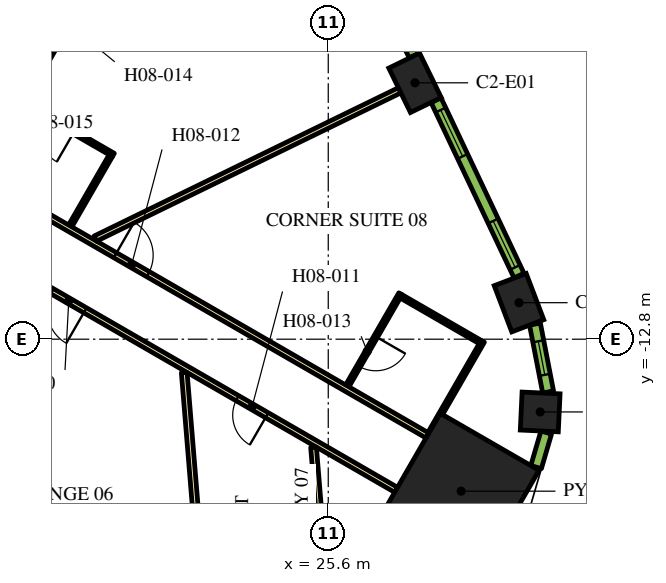
"""IFC4 building model, lengths in metres.
Left out: names, types, materials, properties, quantities, classifications, styles, units other than length and angle.
Written with IfcOpenShell. Run it as: python <this file> out.ifc"""

import sys

from ifc_helpers import new_model, si_unit, direction, frame, frame_2d, origin, origin_2d, place, context, subcontext, project, spatial, rectangle, extrude, element, fill, save


model = new_model("IFC4")
c1 = context("Model", 3, precision=1e-05, world=origin(), true_north=direction((0.0, 1.0)))
c2 = subcontext(c1, "Body", "Model", "MODEL_VIEW")
j1 = project(units=[si_unit("LENGTHUNIT", "METRE"), si_unit("PLANEANGLEUNIT", "RADIAN")], contexts=[c1])
p1 = place(None, origin())
s1 = spatial("IfcSite", under=j1, at=p1, CompositionType="ELEMENT")
p2 = place(p1, origin())
s2 = spatial("IfcBuilding", under=s1, at=p2, CompositionType="ELEMENT")
p3 = place(p2, frame((0.0, 0.0, 107.1)))
s3 = spatial("IfcBuildingStorey", under=s2, at=p3, CompositionType="ELEMENT", Elevation=107.1)
p4 = place(p3, frame((29.097, -16.799, 0.0), z_axis=(0.0, 0.0, 1.0), x_axis=(0.866025403784, -0.5, 0.0)))
e1 = element("IfcColumn", 1, at=p4, inside=s3, PredefinedType="COLUMN", context=c2, shape_type="SweptSolid", body=[
    extrude(rectangle(XDim=3.0, YDim=3.0, at=origin_2d()), origin(), (0.0, 0.0, 1.0), 3.9),
])
p5 = place(p3, frame((31.177, -14.714, 0.0), z_axis=(0.0, 0.0, 1.0), x_axis=(0.046756026083, 0.998906338965, 0.0)))
e2 = element("IfcColumn", 2, at=p5, inside=s3, PredefinedType="COLUMN", context=c2, shape_type="SweptSolid", body=[
    extrude(rectangle(XDim=1.0, YDim=1.0, at=origin_2d()), origin(), (0.0, 0.0, 1.0), 3.9),
])
for number, where, z_axis, x_axis in (
    (3, (30.619, -11.839, 0.0), (0.0, 0.0, 1.0), (-0.355, 0.935, 0.0)),
    (4, (27.883, -6.054, 0.0), (0.0, 0.0, 1.0), (-0.438, 0.899, 0.0)),
):
    element("IfcColumn", number, at=place(p3, frame(where, z_axis=z_axis, x_axis=x_axis)), inside=s3, PredefinedType="COLUMN", context=c2, shape_type="SweptSolid", body=[
        extrude(rectangle(XDim=1.3, YDim=0.9, at=origin_2d()), origin(), (0.0, 0.0, 1.0), 3.9),
    ])
p6 = place(p3, frame((16.412, -8.523, 0.0), z_axis=(0.0, 0.0, 1.0), x_axis=(0.866025629663, -0.499999608766, 0.0)))
e5 = element("IfcWall", 5, at=p6, inside=s3, PredefinedType="PARTITIONING", context=c2, shape_type="SweptSolid", body=[
    extrude(rectangle(XDim=13.624, YDim=0.15, at=frame_2d((6.812, 0.0))), origin(), (0.0, 0.0, 1.0), 2.75),
])
p7 = place(p6, frame((4.134, 0.0, 0.0)))
e6 = element("IfcOpeningElement", 6, at=p7, cuts=e5, PredefinedType="OPENING", context=c2, shape_type="SweptSolid", body=[
    extrude(rectangle(XDim=1.0, YDim=2.1, at=frame_2d((0.5, 1.05))), frame((0.0, 0.085, 0.0), z_axis=(0.0, -1.0, 0.0), x_axis=(1.0, 0.0, 0.0)), (0.0, 0.0, 1.0), 0.17),
])
p8 = place(p3, frame((19.081, -3.9, 0.0), z_axis=(0.0, 0.0, 1.0), x_axis=(-0.499974327079, -0.866040225545, 0.0)))
e7 = element("IfcWall", 7, at=p8, inside=s3, PredefinedType="PARTITIONING", context=c2, shape_type="SweptSolid", body=[
    extrude(rectangle(XDim=5.258, YDim=0.15, at=frame_2d((2.629, 0.0))), origin(), (0.0, 0.0, 1.0), 2.75),
])
p9 = place(p8, frame((0.18, 0.0, 0.0)))
e8 = element("IfcOpeningElement", 8, at=p9, cuts=e7, PredefinedType="OPENING", context=c2, shape_type="SweptSolid", body=[
    extrude(rectangle(XDim=1.0, YDim=2.1, at=frame_2d((0.5, 1.05))), frame((0.0, 0.085, 0.0), z_axis=(0.0, -1.0, 0.0), x_axis=(1.0, 0.0, 0.0)), (0.0, 0.0, 1.0), 0.17),
])
p10 = place(p3, frame((27.386, -16.764, 0.0), z_axis=(0.0, 0.0, 1.0), x_axis=(-0.866022585856, 0.500004880763, 0.0)))
e9 = element("IfcWall", 9, at=p10, inside=s3, PredefinedType="PARTITIONING", context=c2, shape_type="SweptSolid", body=[
    extrude(rectangle(XDim=13.544, YDim=0.15, at=frame_2d((6.772, 0.0))), origin(), (0.0, 0.0, 1.0), 2.75),
])
p11 = place(p10, frame((9.447, 0.0, 0.0)))
e10 = element("IfcOpeningElement", 10, at=p11, cuts=e9, PredefinedType="OPENING", context=c2, shape_type="SweptSolid", body=[
    extrude(rectangle(XDim=1.0, YDim=2.1, at=frame_2d((0.5, 1.05))), frame((0.0, 0.085, 0.0), z_axis=(0.0, -1.0, 0.0), x_axis=(1.0, 0.0, 0.0)), (0.0, 0.0, 1.0), 0.17),
])
p12 = place(p10, frame((3.926, 0.0, 0.0)))
e11 = element("IfcOpeningElement", 11, at=p12, cuts=e9, PredefinedType="OPENING", context=c2, shape_type="SweptSolid", body=[
    extrude(rectangle(XDim=0.9, YDim=2.1, at=frame_2d((0.45, 1.05))), frame((0.0, 0.085, 0.0), z_axis=(0.0, -1.0, 0.0), x_axis=(1.0, 0.0, 0.0)), (0.0, 0.0, 1.0), 0.17),
])
p13 = place(p3, frame((27.478, -6.251, 0.0), z_axis=(0.0, 0.0, 1.0), x_axis=(-0.898940618603, -0.438070501432, 0.0)))
e12 = element("IfcWall", 12, at=p13, inside=s3, PredefinedType="PARTITIONING", context=c2, shape_type="SweptSolid", body=[
    extrude(rectangle(XDim=8.909, YDim=0.15, at=frame_2d((4.455, 0.0))), origin(), (0.0, 0.0, 1.0), 2.75),
])
p14 = place(p3, frame((22.412, -21.016, 0.0), z_axis=(0.0, 0.0, 1.0), x_axis=(-0.081744540534, 0.996653314896, 0.0)))
e13 = element("IfcWall", 13, at=p14, inside=s3, PredefinedType="PARTITIONING", context=c2, shape_type="SweptSolid", body=[
    extrude(rectangle(XDim=7.362, YDim=0.15, at=frame_2d((3.681, 0.0))), origin(), (0.0, 0.0, 1.0), 2.75),
])
p15 = place(p3, frame((25.582, -20.138, 0.0), z_axis=(0.0, 0.0, 1.0), x_axis=(-0.081746132986, 0.996653184283, 0.0)))
e14 = element("IfcWall", 14, at=p15, inside=s3, PredefinedType="PARTITIONING", context=c2, shape_type="SweptSolid", body=[
    extrude(rectangle(XDim=4.51, YDim=0.15, at=frame_2d((2.255, 0.0))), origin(), (0.0, 0.0, 1.0), 2.75),
])
p16 = place(p3, frame((27.5, -11.605, 0.0), z_axis=(0.0, 0.0, 1.0), x_axis=(-0.500049511043, -0.865996816683, 0.0)))
e15 = element("IfcWall", 15, at=p16, inside=s3, PredefinedType="PARTITIONING", context=c2, shape_type="SweptSolid", body=[
    extrude(rectangle(XDim=2.8, YDim=0.1, at=frame_2d((1.4, 0.0))), origin(), (0.0, 0.0, 1.0), 2.75),
])
p17 = place(p16, frame((1.3, 0.0, 0.0)))
e16 = element("IfcOpeningElement", 16, at=p17, cuts=e15, PredefinedType="OPENING", context=c2, shape_type="SweptSolid", body=[
    extrude(rectangle(XDim=0.9, YDim=2.1, at=frame_2d((0.45, 1.05))), frame((0.0, 0.06, 0.0), z_axis=(0.0, -1.0, 0.0), x_axis=(1.0, 0.0, 0.0)), (0.0, 0.0, 1.0), 0.12),
])
p18 = place(p3, frame((27.519, -11.673, 0.0), z_axis=(0.0, 0.0, 1.0), x_axis=(0.866024647952, -0.500001309137, 0.0)))
e17 = element("IfcWall", 17, at=p18, inside=s3, PredefinedType="PARTITIONING", context=c2, shape_type="SweptSolid", body=[
    extrude(rectangle(XDim=2.4, YDim=0.1, at=frame_2d((1.2, 0.0))), origin(), (0.0, 0.0, 1.0), 2.75),
])
p19 = place(p3, frame((28.265, -15.28, 0.0), z_axis=(0.0, 0.0, 1.0), x_axis=(0.500049511043, 0.865996816683, 0.0)))
e18 = element("IfcWall", 18, at=p19, inside=s3, PredefinedType="PARTITIONING", context=c2, shape_type="SweptSolid", body=[
    extrude(rectangle(XDim=2.8, YDim=0.1, at=frame_2d((1.4, 0.0))), origin(), (0.0, 0.0, 1.0), 2.75),
])
p20 = place(p3, frame((19.946, -7.953, 0.0), z_axis=(0.0, 0.0, 1.0), x_axis=(-0.86599734893, 0.500048589285, 0.0)))
e19 = element("IfcWall", 19, at=p20, inside=s3, PredefinedType="PARTITIONING", context=c2, shape_type="SweptSolid", body=[
    extrude(rectangle(XDim=2.7, YDim=0.1, at=frame_2d((1.35, 0.0))), origin(), (0.0, 0.0, 1.0), 2.75),
])
p21 = place(p20, frame((1.2, 0.0, 0.0)))
e20 = element("IfcOpeningElement", 20, at=p21, cuts=e19, PredefinedType="OPENING", context=c2, shape_type="SweptSolid", body=[
    extrude(rectangle(XDim=0.9, YDim=2.1, at=frame_2d((0.45, 1.05))), frame((0.0, 0.06, 0.0), z_axis=(0.0, -1.0, 0.0), x_axis=(1.0, 0.0, 0.0)), (0.0, 0.0, 1.0), 0.12),
])
p22 = place(p3, frame((19.877, -7.972, 0.0), z_axis=(0.0, 0.0, 1.0), x_axis=(-0.500010206181, -0.866019511163, 0.0)))
e21 = element("IfcWall", 21, at=p22, inside=s3, PredefinedType="PARTITIONING", context=c2, shape_type="SweptSolid", body=[
    extrude(rectangle(XDim=2.13, YDim=0.1, at=frame_2d((1.065, 0.0))), origin(), (0.0, 0.0, 1.0), 2.75),
])
p23 = place(p3, frame((31.069, -16.165, 0.0), z_axis=(0.0, 0.0, 1.0), x_axis=(0.281454582132, 0.95957455062, 0.0)))
e22 = element("IfcWall", 22, at=p23, inside=s3, PredefinedType="SOLIDWALL", context=c2, shape_type="SweptSolid", body=[
    extrude(rectangle(XDim=0.947, YDim=0.29, at=frame_2d((0.474, 0.0))), origin(), (0.0, 0.0, 1.0), 3.65),
])
p24 = place(p3, frame((31.385, -14.189, 0.0), z_axis=(0.0, 0.0, 1.0), x_axis=(-0.190409913989, 0.981704672829, 0.0)))
e23 = element("IfcWall", 23, at=p24, inside=s3, PredefinedType="SOLIDWALL", context=c2, shape_type="SweptSolid", body=[
    extrude(rectangle(XDim=1.819, YDim=0.29, at=frame_2d((0.91, 0.0))), origin(), (0.0, 0.0, 1.0), 3.65),
])
p25 = place(p24, frame((0.46, 0.0, 0.9)))
e24 = element("IfcOpeningElement", 24, at=p25, cuts=e23, PredefinedType="OPENING", context=c2, shape_type="SweptSolid", body=[
    extrude(rectangle(XDim=0.9, YDim=2.15, at=frame_2d((0.45, 1.075))), frame((0.0, 0.155, 0.0), z_axis=(0.0, -1.0, 0.0), x_axis=(1.0, 0.0, 0.0)), (0.0, 0.0, 1.0), 0.31),
])
p26 = place(p3, frame((30.62, -11.127, 0.0), z_axis=(0.0, 0.0, 1.0), x_axis=(-0.427543726596, 0.903994669148, 0.0)))
e25 = element("IfcWall", 25, at=p26, inside=s3, PredefinedType="SOLIDWALL", context=c2, shape_type="SweptSolid", body=[
    extrude(rectangle(XDim=5.107, YDim=0.29, at=frame_2d((2.553, 0.0))), origin(), (0.0, 0.0, 1.0), 3.65),
])
p27 = place(p26, frame((0.24, 0.0, 0.9)))
e26 = element("IfcOpeningElement", 26, at=p27, cuts=e25, PredefinedType="OPENING", context=c2, shape_type="SweptSolid", body=[
    extrude(rectangle(XDim=1.35, YDim=2.15, at=frame_2d((0.675, 1.075))), frame((0.0, 0.155, 0.0), z_axis=(0.0, -1.0, 0.0), x_axis=(1.0, 0.0, 0.0)), (0.0, 0.0, 1.0), 0.31),
])
p28 = place(p26, frame((3.471, 0.0, 0.9)))
e27 = element("IfcOpeningElement", 27, at=p28, cuts=e25, PredefinedType="OPENING", context=c2, shape_type="SweptSolid", body=[
    extrude(rectangle(XDim=1.35, YDim=2.15, at=frame_2d((0.675, 1.075))), frame((0.0, 0.155, 0.0), z_axis=(0.0, -1.0, 0.0), x_axis=(1.0, 0.0, 0.0)), (0.0, 0.0, 1.0), 0.31),
])
p29 = place(p3, frame((27.864, -5.336, 0.0), z_axis=(0.0, 0.0, 1.0), x_axis=(-0.448534297211, 0.893765620409, 0.0)))
e28 = element("IfcWall", 28, at=p29, inside=s3, PredefinedType="SOLIDWALL", context=c2, shape_type="SweptSolid", body=[
    extrude(rectangle(XDim=5.1, YDim=0.29, at=frame_2d((2.55, 0.0))), origin(), (0.0, 0.0, 1.0), 3.65),
])
p30 = place(p29, frame((0.272, 0.0, 0.9)))
e29 = element("IfcOpeningElement", 29, at=p30, cuts=e28, PredefinedType="OPENING", context=c2, shape_type="SweptSolid", body=[
    extrude(rectangle(XDim=1.35, YDim=2.15, at=frame_2d((0.675, 1.075))), frame((0.0, 0.155, 0.0), z_axis=(0.0, -1.0, 0.0), x_axis=(1.0, 0.0, 0.0)), (0.0, 0.0, 1.0), 0.31),
])
p31 = place(p29, frame((3.478, 0.0, 0.9)))
e30 = element("IfcOpeningElement", 30, at=p31, cuts=e28, PredefinedType="OPENING", context=c2, shape_type="SweptSolid", body=[
    extrude(rectangle(XDim=1.35, YDim=2.15, at=frame_2d((0.675, 1.075))), frame((0.0, 0.155, 0.0), z_axis=(0.0, -1.0, 0.0), x_axis=(1.0, 0.0, 0.0)), (0.0, 0.0, 1.0), 0.31),
])
p32 = place(p11, origin())
e31 = element("IfcDoor", 31, at=p32, inside=s3, OperationType="SINGLE_SWING_RIGHT", PredefinedType="DOOR", context=c2, shape_type="SweptSolid", body=[
    extrude(rectangle(XDim=1.0, YDim=2.1, at=frame_2d((0.5, 1.05))), frame((0.0, 0.025, 0.0), z_axis=(0.0, -1.0, 0.0), x_axis=(1.0, 0.0, 0.0)), (0.0, 0.0, 1.0), 0.05),
])
fill(e10, e31)
p33 = place(p12, origin())
e32 = element("IfcDoor", 32, at=p33, inside=s3, OperationType="SINGLE_SWING_LEFT", PredefinedType="DOOR", context=c2, shape_type="SweptSolid", body=[
    extrude(rectangle(XDim=0.9, YDim=2.1, at=frame_2d((0.45, 1.05))), frame((0.0, 0.025, 0.0), z_axis=(0.0, -1.0, 0.0), x_axis=(1.0, 0.0, 0.0)), (0.0, 0.0, 1.0), 0.05),
])
fill(e11, e32)
p34 = place(p7, origin())
e33 = element("IfcDoor", 33, at=p34, inside=s3, OperationType="SINGLE_SWING_LEFT", PredefinedType="DOOR", context=c2, shape_type="SweptSolid", body=[
    extrude(rectangle(XDim=1.0, YDim=2.1, at=frame_2d((0.5, 1.05))), frame((0.0, 0.025, 0.0), z_axis=(0.0, -1.0, 0.0), x_axis=(1.0, 0.0, 0.0)), (0.0, 0.0, 1.0), 0.05),
])
fill(e6, e33)
p35 = place(p17, origin())
e34 = element("IfcDoor", 34, at=p35, inside=s3, OperationType="SINGLE_SWING_LEFT", PredefinedType="DOOR", context=c2, shape_type="SweptSolid", body=[
    extrude(rectangle(XDim=0.9, YDim=2.1, at=frame_2d((0.45, 1.05))), frame((0.0, 0.025, 0.0), z_axis=(0.0, -1.0, 0.0), x_axis=(1.0, 0.0, 0.0)), (0.0, 0.0, 1.0), 0.05),
])
fill(e16, e34)
p36 = place(p21, origin())
e35 = element("IfcDoor", 35, at=p36, inside=s3, OperationType="SINGLE_SWING_RIGHT", PredefinedType="DOOR", context=c2, shape_type="SweptSolid", body=[
    extrude(rectangle(XDim=0.9, YDim=2.1, at=frame_2d((0.45, 1.05))), frame((0.0, 0.025, 0.0), z_axis=(0.0, -1.0, 0.0), x_axis=(1.0, 0.0, 0.0)), (0.0, 0.0, 1.0), 0.05),
])
fill(e20, e35)
p37 = place(p25, origin())
e36 = element("IfcWindow", 36, at=p37, inside=s3, PartitioningType="SINGLE_PANEL", PredefinedType="WINDOW", context=c2, shape_type="SweptSolid", body=[
    extrude(rectangle(XDim=0.9, YDim=2.15, at=frame_2d((0.45, 1.075))), frame((0.0, 0.015, 0.0), z_axis=(0.0, -1.0, 0.0), x_axis=(1.0, 0.0, 0.0)), (0.0, 0.0, 1.0), 0.06),
])
fill(e24, e36)
p38 = place(p27, origin())
e37 = element("IfcWindow", 37, at=p38, inside=s3, PartitioningType="DOUBLE_PANEL_VERTICAL", PredefinedType="WINDOW", context=c2, shape_type="SweptSolid", body=[
    extrude(rectangle(XDim=1.35, YDim=2.15, at=frame_2d((0.675, 1.075))), frame((0.0, 0.015, 0.0), z_axis=(0.0, -1.0, 0.0), x_axis=(1.0, 0.0, 0.0)), (0.0, 0.0, 1.0), 0.06),
])
fill(e26, e37)
p39 = place(p28, origin())
e38 = element("IfcWindow", 38, at=p39, inside=s3, PartitioningType="DOUBLE_PANEL_VERTICAL", PredefinedType="WINDOW", context=c2, shape_type="SweptSolid", body=[
    extrude(rectangle(XDim=1.35, YDim=2.15, at=frame_2d((0.675, 1.075))), frame((0.0, 0.015, 0.0), z_axis=(0.0, -1.0, 0.0), x_axis=(1.0, 0.0, 0.0)), (0.0, 0.0, 1.0), 0.06),
])
fill(e27, e38)
save(model, sys.argv[1])
